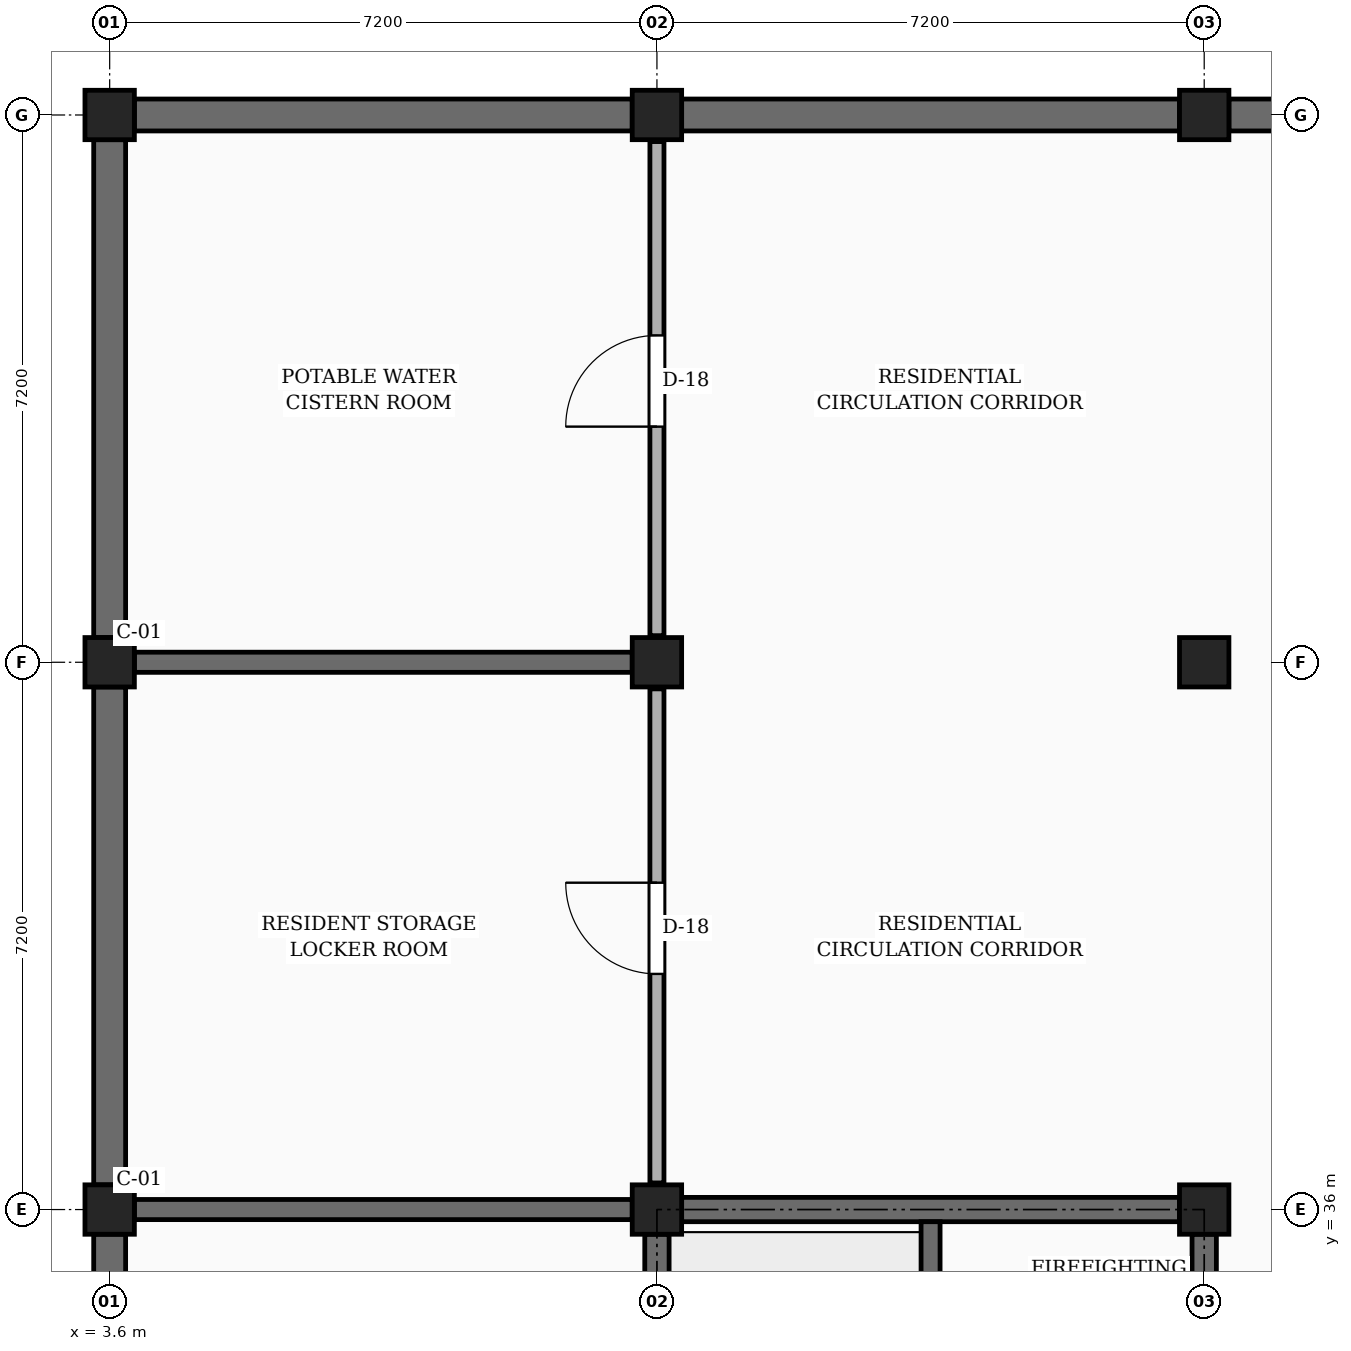
"""IFC4 building model, lengths in metres.
Left out: names, types, materials, properties, quantities, classifications, styles, units other than length and angle.
Written with IfcOpenShell. Run it as: python <this file> out.ifc"""

import sys

from ifc_helpers import new_model, si_unit, direction, frame, frame_2d, origin, origin_2d, place, context, subcontext, project, spatial, rectangle, extrude, element, fill, save


model = new_model("IFC4")
c1 = context("Model", 3, precision=1e-05, world=origin(), true_north=direction((0.0, 1.0)))
c2 = subcontext(c1, "Body", "Model", "MODEL_VIEW")
j1 = project(units=[si_unit("LENGTHUNIT", "METRE"), si_unit("PLANEANGLEUNIT", "RADIAN")], contexts=[c1])
p1 = place(None, origin())
s1 = spatial("IfcSite", under=j1, at=p1, CompositionType="ELEMENT")
p2 = place(p1, origin())
s2 = spatial("IfcBuilding", under=s1, at=p2, CompositionType="ELEMENT")
p3 = place(p2, frame((0.0, 0.0, -4.2)))
s3 = spatial("IfcBuildingStorey", under=s2, at=p3, CompositionType="ELEMENT", Elevation=-4.2)
for number, where, z_axis, x_axis in (
    (1, (3.6, 36.0, 0.0), (0.0, 0.0, 1.0), (1.0, 0.0, 0.0)),
    (2, (3.6, 43.2, 0.0), (0.0, 0.0, 1.0), (1.0, 0.0, 0.0)),
    (3, (3.6, 50.4, 0.0), (0.0, 0.0, 1.0), (1.0, 0.0, 0.0)),
    (4, (10.8, 36.0, 0.0), (0.0, 0.0, 1.0), (1.0, 0.0, 0.0)),
    (5, (10.8, 43.2, 0.0), (0.0, 0.0, 1.0), (1.0, 0.0, 0.0)),
    (6, (10.8, 50.4, 0.0), (0.0, 0.0, 1.0), (1.0, 0.0, 0.0)),
    (7, (18.0, 36.0, 0.0), (0.0, 0.0, 1.0), (1.0, 0.0, 0.0)),
    (8, (18.0, 43.2, 0.0), (0.0, 0.0, 1.0), (1.0, 0.0, 0.0)),
    (9, (18.0, 50.4, 0.0), (0.0, 0.0, 1.0), (1.0, 0.0, 0.0)),
):
    element("IfcColumn", number, at=place(p3, frame(where, z_axis=z_axis, x_axis=x_axis)), inside=s3, PredefinedType="COLUMN", context=c2, shape_type="SweptSolid", body=[
        extrude(rectangle(XDim=0.65, YDim=0.65, at=origin_2d()), origin(), (0.0, 0.0, 1.0), 4.2),
    ])
for number, where, z_axis, x_axis in (
    (10, (10.475, 50.4, 0.0), (0.0, 0.0, 1.0), (-1.0, 0.0, 0.0)),
    (11, (17.675, 50.4, 0.0), (0.0, 0.0, 1.0), (-1.0, 0.0, 0.0)),
    (12, (24.875, 50.4, 0.0), (0.0, 0.0, 1.0), (-1.0, 0.0, 0.0)),
    (13, (3.6, 35.675, 0.0), (0.0, 0.0, 1.0), (0.0, -1.0, 0.0)),
    (14, (3.6, 42.875, 0.0), (0.0, 0.0, 1.0), (0.0, -1.0, 0.0)),
    (15, (3.6, 50.075, 0.0), (0.0, 0.0, 1.0), (0.0, -1.0, 0.0)),
):
    element("IfcWall", number, at=place(p3, frame(where, z_axis=z_axis, x_axis=x_axis)), inside=s3, PredefinedType="USERDEFINED", context=c2, shape_type="SweptSolid", body=[
        extrude(rectangle(XDim=6.55, YDim=0.42, at=frame_2d((3.275, 0.0))), origin(), (0.0, 0.0, 1.0), 3.03),
    ])
for number, where, z_axis, x_axis in (
    (16, (3.925, 36.0, 0.0), (0.0, 0.0, 1.0), (1.0, 0.0, 0.0)),
    (17, (3.925, 43.2, 0.0), (0.0, 0.0, 1.0), (1.0, 0.0, 0.0)),
):
    element("IfcWall", number, at=place(p3, frame(where, z_axis=z_axis, x_axis=x_axis)), inside=s3, PredefinedType="SOLIDWALL", context=c2, shape_type="SweptSolid", body=[
        extrude(rectangle(XDim=6.55, YDim=0.265, at=frame_2d((3.275, 0.0))), origin(), (0.0, 0.0, 1.0), 3.18),
    ])
for number, where, z_axis, x_axis in (
    (18, (10.8, 29.125, 0.0), (0.0, 0.0, 1.0), (0.0, 1.0, 0.0)),
    (19, (11.125, 36.0, 0.0), (0.0, 0.0, 1.0), (1.0, 0.0, 0.0)),
):
    element("IfcWall", number, at=place(p3, frame(where, z_axis=z_axis, x_axis=x_axis)), inside=s3, PredefinedType="SHEAR", context=c2, shape_type="SweptSolid", body=[
        extrude(rectangle(XDim=6.55, YDim=0.32, at=frame_2d((3.275, 0.0))), origin(), (0.0, 0.0, 1.0), 3.88),
    ])
p4 = place(p3, frame((18.0, 29.125, 0.0), z_axis=(0.0, 0.0, 1.0), x_axis=(0.0, 1.0, 0.0)))
e20 = element("IfcWall", 20, at=p4, inside=s3, PredefinedType="SHEAR", context=c2, shape_type="SweptSolid", body=[
    extrude(rectangle(XDim=6.55, YDim=0.32, at=frame_2d((3.275, 0.0))), origin(), (0.0, 0.0, 1.0), 3.88),
])
p5 = place(p4, frame((1.5, 0.0, 0.0)))
e21 = element("IfcOpeningElement", 21, at=p5, cuts=e20, PredefinedType="OPENING", context=c2, shape_type="SweptSolid", body=[
    extrude(rectangle(XDim=1.1, YDim=2.15, at=frame_2d((0.55, 1.075))), frame((0.0, 0.17, 0.0), z_axis=(0.0, -1.0, 0.0), x_axis=(1.0, 0.0, 0.0)), (0.0, 0.0, 1.0), 0.34),
])
p6 = place(p3, frame((14.4, 28.96, 0.0), z_axis=(0.0, 0.0, 1.0), x_axis=(0.0, 1.0, 0.0)))
e22 = element("IfcWall", 22, at=p6, inside=s3, PredefinedType="SHEAR", context=c2, shape_type="SweptSolid", body=[
    extrude(rectangle(XDim=6.88, YDim=0.25, at=frame_2d((3.44, 0.0))), origin(), (0.0, 0.0, 1.0), 3.88),
])
p7 = place(p6, frame((0.44, 0.0, 0.0)))
e23 = element("IfcOpeningElement", 23, at=p7, cuts=e22, PredefinedType="OPENING", context=c2, shape_type="SweptSolid", body=[
    extrude(rectangle(XDim=1.05, YDim=2.15, at=frame_2d((0.525, 1.075))), frame((0.0, 0.135, 0.0), z_axis=(0.0, -1.0, 0.0), x_axis=(1.0, 0.0, 0.0)), (0.0, 0.0, 1.0), 0.27),
])
p8 = place(p3, frame((10.8, 36.35, 0.0), z_axis=(0.0, 0.0, 1.0), x_axis=(0.0, 1.0, 0.0)))
e24 = element("IfcWall", 24, at=p8, inside=s3, PredefinedType="PARTITIONING", context=c2, shape_type="SweptSolid", body=[
    extrude(rectangle(XDim=6.5, YDim=0.185, at=frame_2d((3.25, 0.0))), origin(), (0.0, 0.0, 1.0), 3.08),
])
p9 = place(p8, frame((2.75, 0.0, 0.0)))
e25 = element("IfcOpeningElement", 25, at=p9, cuts=e24, PredefinedType="OPENING", context=c2, shape_type="SweptSolid", body=[
    extrude(rectangle(XDim=1.2, YDim=2.2, at=frame_2d((0.6, 1.1))), frame((0.0, 0.103, 0.0), z_axis=(0.0, -1.0, 0.0), x_axis=(1.0, 0.0, 0.0)), (0.0, 0.0, 1.0), 0.205),
])
p10 = place(p3, frame((10.8, 43.55, 0.0), z_axis=(0.0, 0.0, 1.0), x_axis=(0.0, 1.0, 0.0)))
e26 = element("IfcWall", 26, at=p10, inside=s3, PredefinedType="PARTITIONING", context=c2, shape_type="SweptSolid", body=[
    extrude(rectangle(XDim=6.5, YDim=0.185, at=frame_2d((3.25, 0.0))), origin(), (0.0, 0.0, 1.0), 3.08),
])
p11 = place(p10, frame((2.75, 0.0, 0.0)))
e27 = element("IfcOpeningElement", 27, at=p11, cuts=e26, PredefinedType="OPENING", context=c2, shape_type="SweptSolid", body=[
    extrude(rectangle(XDim=1.2, YDim=2.2, at=frame_2d((0.6, 1.1))), frame((0.0, 0.103, 0.0), z_axis=(0.0, -1.0, 0.0), x_axis=(1.0, 0.0, 0.0)), (0.0, 0.0, 1.0), 0.205),
])
p12 = place(p9, origin())
e28 = element("IfcDoor", 28, at=p12, inside=s3, OperationType="SINGLE_SWING_RIGHT", PredefinedType="DOOR", context=c2, shape_type="SweptSolid", body=[
    extrude(rectangle(XDim=1.2, YDim=2.2, at=frame_2d((0.6, 1.1))), frame((0.0, 0.025, 0.0), z_axis=(0.0, -1.0, 0.0), x_axis=(1.0, 0.0, 0.0)), (0.0, 0.0, 1.0), 0.05),
])
fill(e25, e28)
p13 = place(p11, origin())
e29 = element("IfcDoor", 29, at=p13, inside=s3, OperationType="SINGLE_SWING_LEFT", PredefinedType="DOOR", context=c2, shape_type="SweptSolid", body=[
    extrude(rectangle(XDim=1.2, YDim=2.2, at=frame_2d((0.6, 1.1))), frame((0.0, 0.025, 0.0), z_axis=(0.0, -1.0, 0.0), x_axis=(1.0, 0.0, 0.0)), (0.0, 0.0, 1.0), 0.05),
])
fill(e27, e29)
save(model, sys.argv[1])
